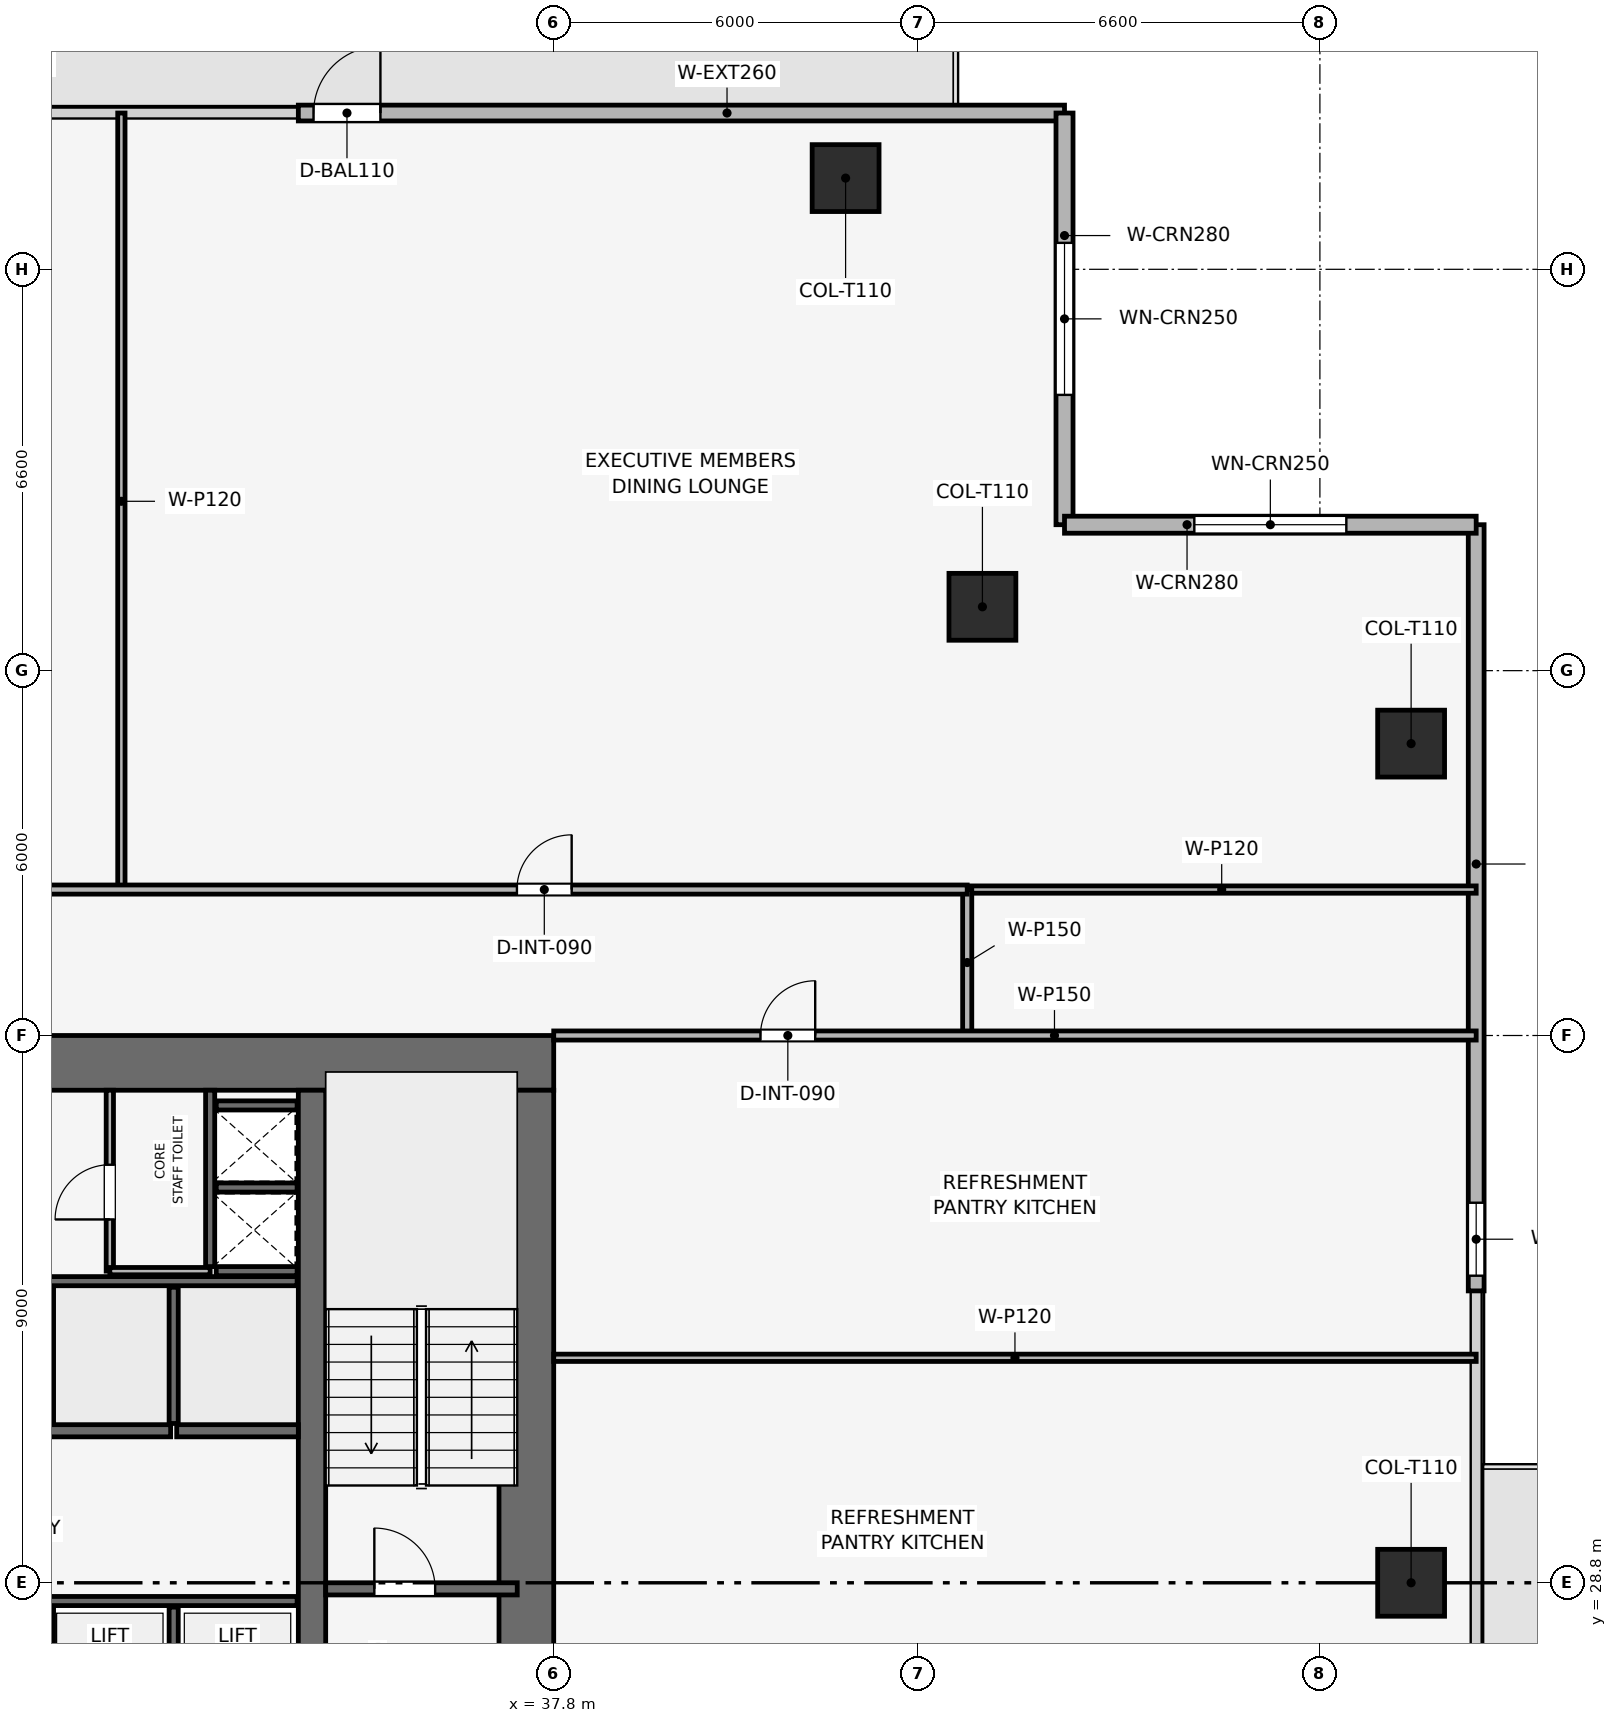
"""IFC4 building model, lengths in metres.
Left out: names, types, materials, properties, quantities, classifications, styles, units other than length and angle.
Written with IfcOpenShell. Run it as: python <this file> out.ifc"""

import sys

from ifc_helpers import new_model, si_unit, direction, frame, frame_2d, origin, origin_2d, place, context, subcontext, project, spatial, rectangle, extrude, element, fill, save


model = new_model("IFC4")
c1 = context("Model", 3, precision=1e-05, world=origin(), true_north=direction((0.0, 1.0)))
c2 = subcontext(c1, "Body", "Model", "MODEL_VIEW")
j1 = project(units=[si_unit("LENGTHUNIT", "METRE"), si_unit("PLANEANGLEUNIT", "RADIAN")], contexts=[c1])
p1 = place(None, origin())
s1 = spatial("IfcSite", under=j1, at=p1, CompositionType="ELEMENT")
p2 = place(p1, origin())
s2 = spatial("IfcBuilding", under=s1, at=p2, CompositionType="ELEMENT")
p3 = place(p2, frame((0.0, 0.0, 149.55)))
s3 = spatial("IfcBuildingStorey", under=s2, at=p3, CompositionType="ELEMENT", Elevation=149.55)
p4 = place(p3, frame((19.8, 37.35, 0.0), z_axis=(0.0, 0.0, 1.0), x_axis=(1.0, 0.0, 0.0)))
e1 = element("IfcWall", 1, at=p4, inside=s3, PredefinedType="SHEAR", context=c2, shape_type="SweptSolid", body=[
    extrude(rectangle(XDim=18.0, YDim=0.9, at=frame_2d((9.0, 0.0))), origin(), (0.0, 0.0, 1.0), 3.75),
])
p5 = place(p4, frame((7.05, 0.0, 0.0)))
e2 = element("IfcOpeningElement", 2, at=p5, cuts=e1, PredefinedType="OPENING", context=c2, shape_type="SweptSolid", body=[
    extrude(rectangle(XDim=1.1, YDim=2.15, at=frame_2d((0.55, 1.075))), frame((0.0, 0.46, 0.0), z_axis=(0.0, -1.0, 0.0), x_axis=(1.0, 0.0, 0.0)), (0.0, 0.0, 1.0), 0.92),
])
p6 = place(p3, frame((37.35, 20.7, 0.0), z_axis=(0.0, 0.0, 1.0), x_axis=(0.0, 1.0, 0.0)))
e3 = element("IfcWall", 3, at=p6, inside=s3, PredefinedType="SHEAR", context=c2, shape_type="SweptSolid", body=[
    extrude(rectangle(XDim=16.2, YDim=0.9, at=frame_2d((8.1, 0.0))), origin(), (0.0, 0.0, 1.0), 3.75),
])
p7 = place(p6, frame((4.6, 0.0, 0.0)))
e4 = element("IfcOpeningElement", 4, at=p7, cuts=e3, PredefinedType="OPENING", context=c2, shape_type="SweptSolid", body=[
    extrude(rectangle(XDim=1.1, YDim=2.15, at=frame_2d((0.55, 1.075))), frame((0.0, 0.46, 0.0), z_axis=(0.0, -1.0, 0.0), x_axis=(1.0, 0.0, 0.0)), (0.0, 0.0, 1.0), 0.92),
])
p8 = place(p3, frame((33.825, 20.7, 0.0), z_axis=(0.0, 0.0, 1.0), x_axis=(0.0, 1.0, 0.0)))
e5 = element("IfcWall", 5, at=p8, inside=s3, PredefinedType="SHEAR", context=c2, shape_type="SweptSolid", body=[
    extrude(rectangle(XDim=16.2, YDim=0.45, at=frame_2d((8.1, 0.0))), origin(), (0.0, 0.0, 1.0), 3.75),
])
for number, where, z_axis, x_axis in (
    (6, (51.9, 28.8, 0.003), (0.0, 0.0, 1.0), (1.0, 0.0, 0.0)),
    (7, (51.9, 42.6, 0.003), (0.0, 0.0, 1.0), (1.0, 0.0, 0.0)),
    (8, (42.6, 51.9, 0.003), (0.0, 0.0, 1.0), (1.0, 0.0, 0.0)),
    (9, (44.85, 44.85, 0.003), (0.0, 0.0, 1.0), (1.0, 0.0, 0.0)),
):
    element("IfcColumn", number, at=place(p3, frame(where, z_axis=z_axis, x_axis=x_axis)), inside=s3, PredefinedType="COLUMN", context=c2, shape_type="SweptSolid", body=[
        extrude(rectangle(XDim=1.1, YDim=1.1, at=origin_2d()), origin(), (0.0, 0.0, 1.0), 3.489),
    ])
p9 = place(p3, frame((33.6, 52.97, 0.0), z_axis=(0.0, 0.0, 1.0), x_axis=(1.0, 0.0, 0.0)))
e10 = element("IfcWall", 10, at=p9, inside=s3, PredefinedType="SOLIDWALL", context=c2, shape_type="SweptSolid", body=[
    extrude(rectangle(XDim=12.6, YDim=0.26, at=frame_2d((6.3, 0.0))), origin(), (0.0, 0.0, 1.0), 3.495),
])
p10 = place(p9, frame((0.25, 0.0, 0.0)))
e11 = element("IfcOpeningElement", 11, at=p10, cuts=e10, PredefinedType="OPENING", context=c2, shape_type="SweptSolid", body=[
    extrude(rectangle(XDim=1.1, YDim=2.2, at=frame_2d((0.55, 1.1))), frame((0.0, 0.14, 0.0), z_axis=(0.0, -1.0, 0.0), x_axis=(1.0, 0.0, 0.0)), (0.0, 0.0, 1.0), 0.28),
])
p11 = place(p3, frame((52.97, 46.2, 0.0), z_axis=(0.0, 0.0, 1.0), x_axis=(0.0, -1.0, 0.0)))
e12 = element("IfcWall", 12, at=p11, inside=s3, PredefinedType="SOLIDWALL", context=c2, shape_type="SweptSolid", body=[
    extrude(rectangle(XDim=12.6, YDim=0.26, at=frame_2d((6.3, 0.0))), origin(), (0.0, 0.0, 1.0), 3.495),
])
p12 = place(p11, frame((11.15, 0.0, 0.9)))
e13 = element("IfcOpeningElement", 13, at=p12, cuts=e12, PredefinedType="OPENING", context=c2, shape_type="SweptSolid", body=[
    extrude(rectangle(XDim=1.2, YDim=2.1, at=frame_2d((0.6, 1.05))), frame((0.0, 0.14, 0.0), z_axis=(0.0, -1.0, 0.0), x_axis=(1.0, 0.0, 0.0)), (0.0, 0.0, 1.0), 0.28),
])
p13 = place(p3, frame((46.2, 52.97, 0.0), z_axis=(0.0, 0.0, 1.0), x_axis=(0.0, -1.0, 0.0)))
e14 = element("IfcWall", 14, at=p13, inside=s3, PredefinedType="SOLIDWALL", context=c2, shape_type="SweptSolid", body=[
    extrude(rectangle(XDim=6.77, YDim=0.28, at=frame_2d((3.385, 0.0))), origin(), (0.0, 0.0, 1.0), 3.495),
])
p14 = place(p13, frame((2.135, 0.0, 0.9)))
e15 = element("IfcOpeningElement", 15, at=p14, cuts=e14, PredefinedType="OPENING", context=c2, shape_type="SweptSolid", body=[
    extrude(rectangle(XDim=2.5, YDim=1.9, at=frame_2d((1.25, 0.95))), frame((0.0, 0.15, 0.0), z_axis=(0.0, -1.0, 0.0), x_axis=(1.0, 0.0, 0.0)), (0.0, 0.0, 1.0), 0.3),
])
p15 = place(p3, frame((46.2, 46.2, 0.0), z_axis=(0.0, 0.0, 1.0), x_axis=(1.0, 0.0, 0.0)))
e16 = element("IfcWall", 16, at=p15, inside=s3, PredefinedType="SOLIDWALL", context=c2, shape_type="SweptSolid", body=[
    extrude(rectangle(XDim=6.77, YDim=0.28, at=frame_2d((3.385, 0.0))), origin(), (0.0, 0.0, 1.0), 3.495),
])
p16 = place(p15, frame((2.135, 0.0, 0.9)))
e17 = element("IfcOpeningElement", 17, at=p16, cuts=e16, PredefinedType="OPENING", context=c2, shape_type="SweptSolid", body=[
    extrude(rectangle(XDim=2.5, YDim=1.9, at=frame_2d((1.25, 0.95))), frame((0.0, 0.15, 0.0), z_axis=(0.0, -1.0, 0.0), x_axis=(1.0, 0.0, 0.0)), (0.0, 0.0, 1.0), 0.3),
])
p17 = place(p3, frame((34.05, 28.7, 0.0), z_axis=(0.0, 0.0, 1.0), x_axis=(1.0, 0.0, 0.0)))
e18 = element("IfcWall", 18, at=p17, inside=s3, PredefinedType="SHEAR", context=c2, shape_type="SweptSolid", body=[
    extrude(rectangle(XDim=3.15, YDim=0.2, at=frame_2d((1.575, 0.0))), origin(), (0.0, 0.0, 1.0), 3.495),
])
p18 = place(p17, frame((0.8, 0.0, 0.0)))
e19 = element("IfcOpeningElement", 19, at=p18, cuts=e18, PredefinedType="OPENING", context=c2, shape_type="SweptSolid", body=[
    extrude(rectangle(XDim=1.0, YDim=2.1, at=frame_2d((0.5, 1.05))), frame((0.0, 0.11, 0.0), z_axis=(0.0, -1.0, 0.0), x_axis=(1.0, 0.0, 0.0)), (0.0, 0.0, 1.0), 0.22),
])
p19 = place(p3, frame((32.15, 34.0, 0.0), z_axis=(0.0, 0.0, 1.0), x_axis=(0.0, 1.0, 0.0)))
e20 = element("IfcWall", 20, at=p19, inside=s3, PredefinedType="SHEAR", context=c2, shape_type="SweptSolid", body=[
    extrude(rectangle(XDim=2.9, YDim=0.15, at=frame_2d((1.45, 0.0))), origin(), (0.0, 0.0, 1.0), 3.495),
])
for number, where, z_axis, x_axis in (
    (21, (32.25, 33.925, 0.0), (0.0, 0.0, 1.0), (1.0, 0.0, 0.0)),
    (22, (32.25, 35.3, 0.0), (0.0, 0.0, 1.0), (1.0, 0.0, 0.0)),
):
    element("IfcWall", number, at=place(p3, frame(where, z_axis=z_axis, x_axis=x_axis)), inside=s3, PredefinedType="SHEAR", context=c2, shape_type="SweptSolid", body=[
        extrude(rectangle(XDim=1.33, YDim=0.15, at=frame_2d((0.665, 0.0))), origin(), (0.0, 0.0, 1.0), 3.495),
    ])
for number, where, z_axis, x_axis in (
    (23, (29.5, 31.3, 0.0), (0.0, 0.0, 1.0), (1.0, 0.0, 0.0)),
    (24, (31.6, 31.3, 0.0), (0.0, 0.0, 1.0), (1.0, 0.0, 0.0)),
):
    element("IfcWall", number, at=place(p3, frame(where, z_axis=z_axis, x_axis=x_axis)), inside=s3, PredefinedType="SHEAR", context=c2, shape_type="SweptSolid", body=[
        extrude(rectangle(XDim=2.0, YDim=0.2, at=frame_2d((1.0, 0.0))), origin(), (0.0, 0.0, 1.0), 3.495),
    ])
p20 = place(p3, frame((32.25, 36.65, 0.0), z_axis=(0.0, 0.0, 1.0), x_axis=(1.0, 0.0, 0.0)))
e25 = element("IfcWall", 25, at=p20, inside=s3, PredefinedType="SHEAR", context=c2, shape_type="SweptSolid", body=[
    extrude(rectangle(XDim=1.33, YDim=0.15, at=frame_2d((0.665, 0.0))), origin(), (0.0, 0.0, 1.0), 3.495),
])
p21 = place(p3, frame((29.5, 28.5, 0.0), z_axis=(0.0, 0.0, 1.0), x_axis=(1.0, 0.0, 0.0)))
e26 = element("IfcWall", 26, at=p21, inside=s3, PredefinedType="SHEAR", context=c2, shape_type="SweptSolid", body=[
    extrude(rectangle(XDim=4.08, YDim=0.15, at=frame_2d((2.04, 0.0))), origin(), (0.0, 0.0, 1.0), 3.495),
])
for number, where, z_axis, x_axis in (
    (27, (29.5, 26.12, 0.0), (0.0, 0.0, 1.0), (0.0, 1.0, 0.0)),
    (28, (31.55, 26.12, 0.0), (0.0, 0.0, 1.0), (0.0, 1.0, 0.0)),
):
    element("IfcWall", number, at=place(p3, frame(where, z_axis=z_axis, x_axis=x_axis)), inside=s3, PredefinedType="SHEAR", context=c2, shape_type="SweptSolid", body=[
        extrude(rectangle(XDim=2.28, YDim=0.15, at=frame_2d((1.14, 0.0))), origin(), (0.0, 0.0, 1.0), 3.495),
    ])
p22 = place(p3, frame((29.5, 33.76, 0.0), z_axis=(0.0, 0.0, 1.0), x_axis=(1.0, 0.0, 0.0)))
e29 = element("IfcWall", 29, at=p22, inside=s3, PredefinedType="SHEAR", context=c2, shape_type="SweptSolid", body=[
    extrude(rectangle(XDim=4.08, YDim=0.15, at=frame_2d((2.04, 0.0))), origin(), (0.0, 0.0, 1.0), 3.495),
])
for number, where, z_axis, x_axis in (
    (30, (29.5, 31.42, 0.0), (0.0, 0.0, 1.0), (0.0, 1.0, 0.0)),
    (31, (31.55, 31.42, 0.0), (0.0, 0.0, 1.0), (0.0, 1.0, 0.0)),
):
    element("IfcWall", number, at=place(p3, frame(where, z_axis=z_axis, x_axis=x_axis)), inside=s3, PredefinedType="SHEAR", context=c2, shape_type="SweptSolid", body=[
        extrude(rectangle(XDim=2.24, YDim=0.15, at=frame_2d((1.12, 0.0))), origin(), (0.0, 0.0, 1.0), 3.495),
    ])
p23 = place(p3, frame((30.5, 33.925, 0.0), z_axis=(0.0, 0.0, 1.0), x_axis=(0.0, 1.0, 0.0)))
e32 = element("IfcWall", 32, at=p23, inside=s3, PredefinedType="PARTITIONING", context=c2, shape_type="SweptSolid", body=[
    extrude(rectangle(XDim=2.975, YDim=0.12, at=frame_2d((1.487, 0.0))), origin(), (0.0, 0.0, 1.0), 3.495),
])
p24 = place(p23, frame((0.85, 0.0, 0.0)))
e33 = element("IfcOpeningElement", 33, at=p24, cuts=e32, PredefinedType="OPENING", context=c2, shape_type="SweptSolid", body=[
    extrude(rectangle(XDim=0.9, YDim=2.1, at=frame_2d((0.45, 1.05))), frame((0.0, 0.07, 0.0), z_axis=(0.0, -1.0, 0.0), x_axis=(1.0, 0.0, 0.0)), (0.0, 0.0, 1.0), 0.14),
])
p25 = place(p3, frame((30.5, 33.925, 0.0), z_axis=(0.0, 0.0, 1.0), x_axis=(1.0, 0.0, 0.0)))
e34 = element("IfcWall", 34, at=p25, inside=s3, PredefinedType="PARTITIONING", context=c2, shape_type="SweptSolid", body=[
    extrude(rectangle(XDim=1.65, YDim=0.12, at=frame_2d((0.825, 0.0))), origin(), (0.0, 0.0, 1.0), 3.495),
])
p26 = place(p3, frame((30.69, 40.2, 0.0), z_axis=(0.0, 0.0, 1.0), x_axis=(0.0, 1.0, 0.0)))
e35 = element("IfcWall", 35, at=p26, inside=s3, PredefinedType="PARTITIONING", context=c2, shape_type="SweptSolid", body=[
    extrude(rectangle(XDim=12.77, YDim=0.12, at=frame_2d((6.385, 0.0))), origin(), (0.0, 0.0, 1.0), 2.98),
])
p27 = place(p3, frame((37.8, 32.5, 0.0), z_axis=(0.0, 0.0, 1.0), x_axis=(1.0, 0.0, 0.0)))
e36 = element("IfcWall", 36, at=p27, inside=s3, PredefinedType="PARTITIONING", context=c2, shape_type="SweptSolid", body=[
    extrude(rectangle(XDim=15.17, YDim=0.12, at=frame_2d((7.585, 0.0))), origin(), (0.0, 0.0, 1.0), 2.98),
])
p28 = place(p3, frame((44.6, 40.2, 0.0), z_axis=(0.0, 0.0, 1.0), x_axis=(1.0, 0.0, 0.0)))
e37 = element("IfcWall", 37, at=p28, inside=s3, PredefinedType="PARTITIONING", context=c2, shape_type="SweptSolid", body=[
    extrude(rectangle(XDim=8.37, YDim=0.12, at=frame_2d((4.185, 0.0))), origin(), (0.0, 0.0, 1.0), 2.98),
])
p29 = place(p3, frame((44.6, 37.8, 0.0), z_axis=(0.0, 0.0, 1.0), x_axis=(0.0, 1.0, 0.0)))
e38 = element("IfcWall", 38, at=p29, inside=s3, PredefinedType="PARTITIONING", context=c2, shape_type="SweptSolid", body=[
    extrude(rectangle(XDim=2.4, YDim=0.15, at=frame_2d((1.2, 0.0))), origin(), (0.0, 0.0, 1.0), 3.495),
])
p30 = place(p3, frame((37.8, 37.8, 0.0), z_axis=(0.0, 0.0, 1.0), x_axis=(1.0, 0.0, 0.0)))
e39 = element("IfcWall", 39, at=p30, inside=s3, PredefinedType="PARTITIONING", context=c2, shape_type="SweptSolid", body=[
    extrude(rectangle(XDim=15.17, YDim=0.15, at=frame_2d((7.585, 0.0))), origin(), (0.0, 0.0, 1.0), 2.98),
])
p31 = place(p30, frame((3.4, 0.0, 0.0)))
e40 = element("IfcOpeningElement", 40, at=p31, cuts=e39, PredefinedType="OPENING", context=c2, shape_type="SweptSolid", body=[
    extrude(rectangle(XDim=0.9, YDim=2.1, at=frame_2d((0.45, 1.05))), frame((0.0, 0.085, 0.0), z_axis=(0.0, -1.0, 0.0), x_axis=(1.0, 0.0, 0.0)), (0.0, 0.0, 1.0), 0.17),
])
p32 = place(p3, frame((13.0, 40.2, 0.0), z_axis=(0.0, 0.0, 1.0), x_axis=(1.0, 0.0, 0.0)))
e41 = element("IfcWall", 41, at=p32, inside=s3, PredefinedType="PARTITIONING", context=c2, shape_type="SweptSolid", body=[
    extrude(rectangle(XDim=31.6, YDim=0.15, at=frame_2d((15.8, 0.0))), origin(), (0.0, 0.0, 1.0), 3.03),
])
p33 = place(p32, frame((8.395, 0.0, 0.0)))
e42 = element("IfcOpeningElement", 42, at=p33, cuts=e41, PredefinedType="OPENING", context=c2, shape_type="SweptSolid", body=[
    extrude(rectangle(XDim=0.9, YDim=2.1, at=frame_2d((0.45, 1.05))), frame((0.0, 0.085, 0.0), z_axis=(0.0, -1.0, 0.0), x_axis=(1.0, 0.0, 0.0)), (0.0, 0.0, 1.0), 0.17),
])
p34 = place(p32, frame((24.195, 0.0, 0.0)))
e43 = element("IfcOpeningElement", 43, at=p34, cuts=e41, PredefinedType="OPENING", context=c2, shape_type="SweptSolid", body=[
    extrude(rectangle(XDim=0.9, YDim=2.1, at=frame_2d((0.45, 1.05))), frame((0.0, 0.085, 0.0), z_axis=(0.0, -1.0, 0.0), x_axis=(1.0, 0.0, 0.0)), (0.0, 0.0, 1.0), 0.17),
])
p35 = place(p10, origin())
e44 = element("IfcDoor", 44, at=p35, inside=s3, OperationType="SINGLE_SWING_RIGHT", PredefinedType="DOOR", context=c2, shape_type="SweptSolid", body=[
    extrude(rectangle(XDim=1.1, YDim=2.2, at=frame_2d((0.55, 1.1))), frame((0.0, 0.025, 0.0), z_axis=(0.0, -1.0, 0.0), x_axis=(1.0, 0.0, 0.0)), (0.0, 0.0, 1.0), 0.05),
])
fill(e11, e44)
p36 = place(p12, origin())
e45 = element("IfcWindow", 45, at=p36, inside=s3, PartitioningType="SINGLE_PANEL", PredefinedType="WINDOW", context=c2, shape_type="SweptSolid", body=[
    extrude(rectangle(XDim=1.2, YDim=2.1, at=frame_2d((0.6, 1.05))), frame((0.0, 0.03, 0.0), z_axis=(0.0, -1.0, 0.0), x_axis=(1.0, 0.0, 0.0)), (0.0, 0.0, 1.0), 0.06),
])
fill(e13, e45)
p37 = place(p14, origin())
e46 = element("IfcWindow", 46, at=p37, inside=s3, PartitioningType="SINGLE_PANEL", PredefinedType="WINDOW", context=c2, shape_type="SweptSolid", body=[
    extrude(rectangle(XDim=2.5, YDim=1.9, at=frame_2d((1.25, 0.95))), frame((0.0, 0.03, 0.0), z_axis=(0.0, -1.0, 0.0), x_axis=(1.0, 0.0, 0.0)), (0.0, 0.0, 1.0), 0.06),
])
fill(e15, e46)
p38 = place(p16, origin())
e47 = element("IfcWindow", 47, at=p38, inside=s3, PartitioningType="SINGLE_PANEL", PredefinedType="WINDOW", context=c2, shape_type="SweptSolid", body=[
    extrude(rectangle(XDim=2.5, YDim=1.9, at=frame_2d((1.25, 0.95))), frame((0.0, 0.03, 0.0), z_axis=(0.0, -1.0, 0.0), x_axis=(1.0, 0.0, 0.0)), (0.0, 0.0, 1.0), 0.06),
])
fill(e17, e47)
p39 = place(p18, origin())
e48 = element("IfcDoor", 48, at=p39, inside=s3, OperationType="SINGLE_SWING_LEFT", PredefinedType="DOOR", context=c2, shape_type="SweptSolid", body=[
    extrude(rectangle(XDim=1.0, YDim=2.1, at=frame_2d((0.5, 1.05))), frame((0.0, 0.025, 0.0), z_axis=(0.0, -1.0, 0.0), x_axis=(1.0, 0.0, 0.0)), (0.0, 0.0, 1.0), 0.05),
])
fill(e19, e48)
p40 = place(p24, origin())
e49 = element("IfcDoor", 49, at=p40, inside=s3, OperationType="SINGLE_SWING_LEFT", PredefinedType="DOOR", context=c2, shape_type="SweptSolid", body=[
    extrude(rectangle(XDim=0.9, YDim=2.1, at=frame_2d((0.45, 1.05))), frame((0.0, 0.025, 0.0), z_axis=(0.0, -1.0, 0.0), x_axis=(1.0, 0.0, 0.0)), (0.0, 0.0, 1.0), 0.05),
])
fill(e33, e49)
p41 = place(p31, origin())
e50 = element("IfcDoor", 50, at=p41, inside=s3, OperationType="SINGLE_SWING_RIGHT", PredefinedType="DOOR", context=c2, shape_type="SweptSolid", body=[
    extrude(rectangle(XDim=0.9, YDim=2.1, at=frame_2d((0.45, 1.05))), frame((0.0, 0.025, 0.0), z_axis=(0.0, -1.0, 0.0), x_axis=(1.0, 0.0, 0.0)), (0.0, 0.0, 1.0), 0.05),
])
fill(e40, e50)
p42 = place(p34, origin())
e51 = element("IfcDoor", 51, at=p42, inside=s3, OperationType="SINGLE_SWING_RIGHT", PredefinedType="DOOR", context=c2, shape_type="SweptSolid", body=[
    extrude(rectangle(XDim=0.9, YDim=2.1, at=frame_2d((0.45, 1.05))), frame((0.0, 0.025, 0.0), z_axis=(0.0, -1.0, 0.0), x_axis=(1.0, 0.0, 0.0)), (0.0, 0.0, 1.0), 0.05),
])
fill(e43, e51)
save(model, sys.argv[1])
